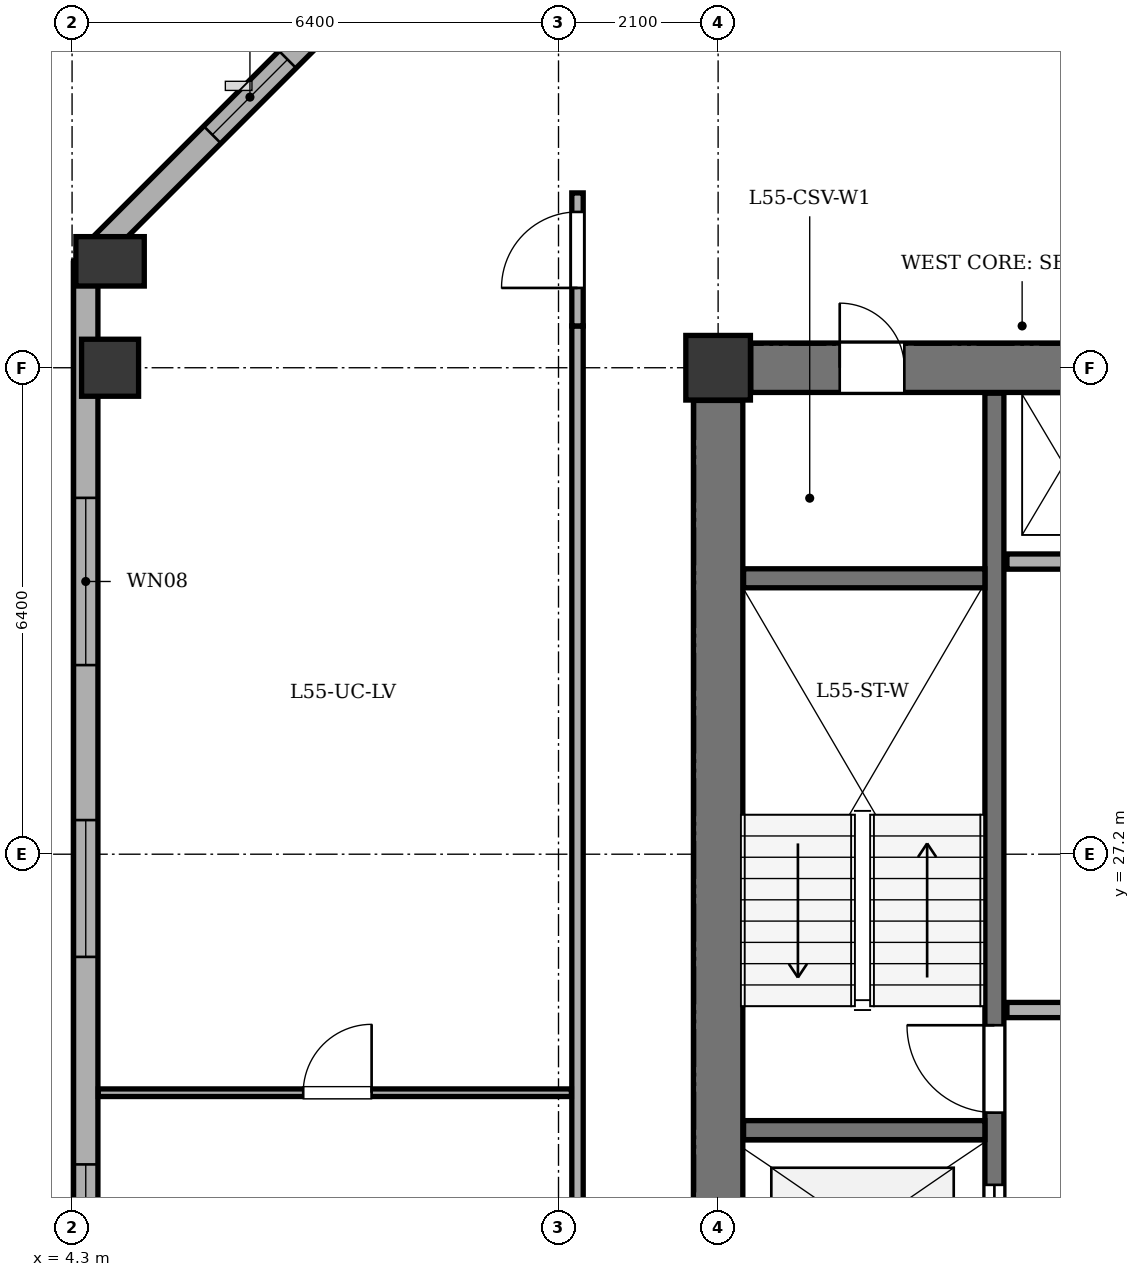
"""IFC4 building model, lengths in metres.
Left out: names, types, materials, properties, quantities, classifications, styles, units other than length and angle.
Written with IfcOpenShell. Run it as: python <this file> out.ifc"""

import sys

from ifc_helpers import new_model, si_unit, direction, frame, frame_2d, origin, origin_2d, place, context, subcontext, project, spatial, rectangle, extrude, element, fill, save


model = new_model("IFC4")
c1 = context("Model", 3, precision=1e-05, world=origin(), true_north=direction((0.0, 1.0)))
c2 = subcontext(c1, "Body", "Model", "MODEL_VIEW")
j1 = project(units=[si_unit("LENGTHUNIT", "METRE"), si_unit("PLANEANGLEUNIT", "RADIAN")], contexts=[c1])
p1 = place(None, origin())
s1 = spatial("IfcSite", under=j1, at=p1, CompositionType="ELEMENT")
p2 = place(p1, origin())
s2 = spatial("IfcBuilding", under=s1, at=p2, CompositionType="ELEMENT")
p3 = place(p2, frame((0.0, 0.0, 214.3)))
s3 = spatial("IfcBuildingStorey", under=s2, at=p3, CompositionType="ELEMENT", Elevation=214.3)
p4 = place(p3, frame((12.8, 33.6, 0.0), z_axis=(0.0, 0.0, 1.0), x_axis=(1.0, 0.0, 0.0)))
e1 = element("IfcColumn", 1, at=p4, inside=s3, PredefinedType="COLUMN", context=c2, shape_type="SweptSolid", body=[
    extrude(rectangle(XDim=0.85, YDim=0.85, at=origin_2d()), origin(), (0.0, 0.0, 1.0), 3.4),
])
p5 = place(p3, frame((4.8, 33.6, 0.0), z_axis=(0.0, 0.0, 1.0), x_axis=(1.0, 0.0, 0.0)))
e2 = element("IfcColumn", 2, at=p5, inside=s3, PredefinedType="COLUMN", context=c2, shape_type="SweptSolid", body=[
    extrude(rectangle(XDim=0.75, YDim=0.75, at=origin_2d()), origin(), (0.0, 0.0, 1.0), 3.4),
])
p6 = place(p3, frame((4.8, 35.0, 0.0), z_axis=(0.0, 0.0, 1.0), x_axis=(1.0, 0.0, 0.0)))
e3 = element("IfcColumn", 3, at=p6, inside=s3, PredefinedType="COLUMN", context=c2, shape_type="SweptSolid", body=[
    extrude(rectangle(XDim=0.65, YDim=0.9, at=origin_2d()), origin(), (0.0, 0.0, 1.0), 3.4),
])
p7 = place(p3, frame((4.48, 7.2, 0.0), z_axis=(0.0, 0.0, 1.0), x_axis=(0.0, 1.0, 0.0)))
e4 = element("IfcWall", 4, at=p7, inside=s3, PredefinedType="STANDARD", context=c2, shape_type="SweptSolid", body=[
    extrude(rectangle(XDim=27.8, YDim=0.32, at=frame_2d((13.9, 0.0))), origin(), (0.0, 0.0, 1.0), 2.725),
])
p8 = place(p7, frame((4.73, 0.0, 0.75)))
e5 = element("IfcOpeningElement", 5, at=p8, cuts=e4, PredefinedType="OPENING", context=c2, shape_type="SweptSolid", body=[
    extrude(rectangle(XDim=1.8, YDim=1.7, at=frame_2d((0.9, 0.85))), frame((0.0, 0.17, 0.0), z_axis=(0.0, -1.0, 0.0), x_axis=(1.0, 0.0, 0.0)), (0.0, 0.0, 1.0), 0.34),
])
p9 = place(p7, frame((9.295, 0.0, 0.75)))
e6 = element("IfcOpeningElement", 6, at=p9, cuts=e4, PredefinedType="OPENING", context=c2, shape_type="SweptSolid", body=[
    extrude(rectangle(XDim=2.2, YDim=1.7, at=frame_2d((1.1, 0.85))), frame((0.0, 0.17, 0.0), z_axis=(0.0, -1.0, 0.0), x_axis=(1.0, 0.0, 0.0)), (0.0, 0.0, 1.0), 0.34),
])
p10 = place(p7, frame((14.669, 0.0, 0.75)))
e7 = element("IfcOpeningElement", 7, at=p10, cuts=e4, PredefinedType="OPENING", context=c2, shape_type="SweptSolid", body=[
    extrude(rectangle(XDim=1.25, YDim=1.7, at=frame_2d((0.625, 0.85))), frame((0.0, 0.17, 0.0), z_axis=(0.0, -1.0, 0.0), x_axis=(1.0, 0.0, 0.0)), (0.0, 0.0, 1.0), 0.34),
])
p11 = place(p7, frame((18.649, 0.0, 0.75)))
e8 = element("IfcOpeningElement", 8, at=p11, cuts=e4, PredefinedType="OPENING", context=c2, shape_type="SweptSolid", body=[
    extrude(rectangle(XDim=1.8, YDim=1.7, at=frame_2d((0.9, 0.85))), frame((0.0, 0.17, 0.0), z_axis=(0.0, -1.0, 0.0), x_axis=(1.0, 0.0, 0.0)), (0.0, 0.0, 1.0), 0.34),
])
p12 = place(p7, frame((22.488, 0.0, 0.75)))
e9 = element("IfcOpeningElement", 9, at=p12, cuts=e4, PredefinedType="OPENING", context=c2, shape_type="SweptSolid", body=[
    extrude(rectangle(XDim=2.2, YDim=1.7, at=frame_2d((1.1, 0.85))), frame((0.0, 0.17, 0.0), z_axis=(0.0, -1.0, 0.0), x_axis=(1.0, 0.0, 0.0)), (0.0, 0.0, 1.0), 0.34),
])
p13 = place(p3, frame((4.48, 35.0, 0.0), z_axis=(0.0, 0.0, 1.0), x_axis=(0.707106781187, 0.707106781187, 0.0)))
e10 = element("IfcWall", 10, at=p13, inside=s3, PredefinedType="STANDARD", context=c2, shape_type="SweptSolid", body=[
    extrude(rectangle(XDim=6.11, YDim=0.32, at=frame_2d((3.055, 0.0))), origin(), (0.0, 0.0, 1.0), 2.725),
])
p14 = place(p13, frame((2.355, 0.0, 0.75)))
e11 = element("IfcOpeningElement", 11, at=p14, cuts=e10, PredefinedType="OPENING", context=c2, shape_type="SweptSolid", body=[
    extrude(rectangle(XDim=1.4, YDim=1.65, at=frame_2d((0.7, 0.825))), frame((0.0, 0.17, 0.0), z_axis=(0.0, -1.0, 0.0), x_axis=(1.0, 0.0, 0.0)), (0.0, 0.0, 1.0), 0.34),
])
p15 = place(p3, frame((12.8, 21.23, 0.0), z_axis=(0.0, 0.0, 1.0), x_axis=(0.0, 1.0, 0.0)))
e12 = element("IfcWall", 12, at=p15, inside=s3, PredefinedType="SHEAR", context=c2, shape_type="SweptSolid", body=[
    extrude(rectangle(XDim=11.94, YDim=0.65, at=frame_2d((5.97, 0.0))), origin(), (0.0, 0.0, 1.0), 3.1),
])
p16 = place(p3, frame((13.23, 33.6, 0.0), z_axis=(0.0, 0.0, 1.0), x_axis=(1.0, 0.0, 0.0)))
e13 = element("IfcWall", 13, at=p16, inside=s3, PredefinedType="SHEAR", context=c2, shape_type="SweptSolid", body=[
    extrude(rectangle(XDim=7.14, YDim=0.65, at=frame_2d((3.57, 0.0))), origin(), (0.0, 0.0, 1.0), 3.1),
])
p17 = place(p16, frame((1.17, 0.0, 0.0)))
e14 = element("IfcOpeningElement", 14, at=p17, cuts=e13, PredefinedType="OPENING", context=c2, shape_type="SweptSolid", body=[
    extrude(rectangle(XDim=0.85, YDim=2.02, at=frame_2d((0.425, 1.01))), frame((0.0, 0.335, 0.0), z_axis=(0.0, -1.0, 0.0), x_axis=(1.0, 0.0, 0.0)), (0.0, 0.0, 1.0), 0.67),
])
p18 = place(p3, frame((16.435, 21.135, 0.0), z_axis=(0.0, 0.0, 1.0), x_axis=(0.0, 1.0, 0.0)))
e15 = element("IfcWall", 15, at=p18, inside=s3, PredefinedType="SHEAR", context=c2, shape_type="SweptSolid", body=[
    extrude(rectangle(XDim=12.13, YDim=0.25, at=frame_2d((6.065, 0.0))), origin(), (0.0, 0.0, 1.0), 3.1),
])
p19 = place(p18, frame((0.515, 0.0, 0.0)))
e16 = element("IfcOpeningElement", 16, at=p19, cuts=e15, PredefinedType="OPENING", context=c2, shape_type="SweptSolid", body=[
    extrude(rectangle(XDim=1.2, YDim=2.15, at=frame_2d((0.6, 1.075))), frame((0.0, 0.135, 0.0), z_axis=(0.0, -1.0, 0.0), x_axis=(1.0, 0.0, 0.0)), (0.0, 0.0, 1.0), 0.27),
])
p20 = place(p18, frame((2.665, 0.0, 0.0)))
e17 = element("IfcOpeningElement", 17, at=p20, cuts=e15, PredefinedType="OPENING", context=c2, shape_type="SweptSolid", body=[
    extrude(rectangle(XDim=1.15, YDim=2.15, at=frame_2d((0.575, 1.075))), frame((0.0, 0.135, 0.0), z_axis=(0.0, -1.0, 0.0), x_axis=(1.0, 0.0, 0.0)), (0.0, 0.0, 1.0), 0.27),
])
for number, where, z_axis, x_axis in (
    (18, (13.135, 23.57, 0.0), (0.0, 0.0, 1.0), (1.0, 0.0, 0.0)),
    (19, (13.135, 30.83, 0.0), (0.0, 0.0, 1.0), (1.0, 0.0, 0.0)),
):
    element("IfcWall", number, at=place(p3, frame(where, z_axis=z_axis, x_axis=x_axis)), inside=s3, PredefinedType="SHEAR", context=c2, shape_type="SweptSolid", body=[
        extrude(rectangle(XDim=3.175, YDim=0.25, at=frame_2d((1.587, 0.0))), origin(), (0.0, 0.0, 1.0), 3.1),
    ])
for number, where, z_axis, x_axis in (
    (20, (16.6, 25.15, 0.0), (0.0, 0.0, 1.0), (1.0, 0.0, 0.0)),
    (21, (16.6, 31.05, 0.0), (0.0, 0.0, 1.0), (1.0, 0.0, 0.0)),
):
    element("IfcWall", number, at=place(p3, frame(where, z_axis=z_axis, x_axis=x_axis)), inside=s3, PredefinedType="SOLIDWALL", context=c2, shape_type="SweptSolid", body=[
        extrude(rectangle(XDim=3.85, YDim=0.2, at=frame_2d((1.925, 0.0))), origin(), (0.0, 0.0, 1.0), 3.1),
    ])
p21 = place(p3, frame((10.95, 20.25, 0.0), z_axis=(0.0, 0.0, 1.0), x_axis=(0.0, 1.0, 0.0)))
e22 = element("IfcWall", 22, at=p21, inside=s3, PredefinedType="PARTITIONING", context=c2, shape_type="SweptSolid", body=[
    extrude(rectangle(XDim=13.9, YDim=0.15, at=frame_2d((6.95, 0.0))), origin(), (0.0, 0.0, 1.0), 3.1),
])
p22 = place(p3, frame((10.95, 34.15, 0.0), z_axis=(0.0, 0.0, 1.0), x_axis=(0.0, 1.0, 0.0)))
e23 = element("IfcWall", 23, at=p22, inside=s3, PredefinedType="PARTITIONING", context=c2, shape_type="SweptSolid", body=[
    extrude(rectangle(XDim=1.75, YDim=0.15, at=frame_2d((0.875, 0.0))), origin(), (0.0, 0.0, 1.0), 3.1),
])
p23 = place(p22, frame((0.5, 0.0, 0.0)))
e24 = element("IfcOpeningElement", 24, at=p23, cuts=e23, PredefinedType="OPENING", context=c2, shape_type="SweptSolid", body=[
    extrude(rectangle(XDim=1.0, YDim=2.1, at=frame_2d((0.5, 1.05))), frame((0.0, 0.085, 0.0), z_axis=(0.0, -1.0, 0.0), x_axis=(1.0, 0.0, 0.0)), (0.0, 0.0, 1.0), 0.17),
])
p24 = place(p3, frame((4.645, 24.062, 0.0), z_axis=(0.0, 0.0, 1.0), x_axis=(1.0, 0.0, 0.0)))
e25 = element("IfcWall", 25, at=p24, inside=s3, PredefinedType="PARTITIONING", context=c2, shape_type="SweptSolid", body=[
    extrude(rectangle(XDim=6.225, YDim=0.1, at=frame_2d((3.113, 0.0))), origin(), (0.0, 0.0, 1.0), 3.1),
])
p25 = place(p24, frame((2.696, 0.0, 0.0)))
e26 = element("IfcOpeningElement", 26, at=p25, cuts=e25, PredefinedType="OPENING", context=c2, shape_type="SweptSolid", body=[
    extrude(rectangle(XDim=0.9, YDim=2.05, at=frame_2d((0.45, 1.025))), frame((0.0, 0.06, 0.0), z_axis=(0.0, -1.0, 0.0), x_axis=(1.0, 0.0, 0.0)), (0.0, 0.0, 1.0), 0.12),
])
p26 = place(p10, origin())
e27 = element("IfcWindow", 27, at=p26, inside=s3, PartitioningType="SINGLE_PANEL", PredefinedType="WINDOW", context=c2, shape_type="SweptSolid", body=[
    extrude(rectangle(XDim=1.25, YDim=1.7, at=frame_2d((0.625, 0.85))), frame((0.0, -0.01, 0.0), z_axis=(0.0, -1.0, 0.0), x_axis=(1.0, 0.0, 0.0)), (0.0, 0.0, 1.0), 0.06),
])
fill(e7, e27)
p27 = place(p11, origin())
e28 = element("IfcWindow", 28, at=p27, inside=s3, PartitioningType="SINGLE_PANEL", PredefinedType="WINDOW", context=c2, shape_type="SweptSolid", body=[
    extrude(rectangle(XDim=1.8, YDim=1.7, at=frame_2d((0.9, 0.85))), frame((0.0, -0.01, 0.0), z_axis=(0.0, -1.0, 0.0), x_axis=(1.0, 0.0, 0.0)), (0.0, 0.0, 1.0), 0.06),
])
fill(e8, e28)
p28 = place(p12, origin())
e29 = element("IfcWindow", 29, at=p28, inside=s3, PartitioningType="SINGLE_PANEL", PredefinedType="WINDOW", context=c2, shape_type="SweptSolid", body=[
    extrude(rectangle(XDim=2.2, YDim=1.7, at=frame_2d((1.1, 0.85))), frame((0.0, -0.01, 0.0), z_axis=(0.0, -1.0, 0.0), x_axis=(1.0, 0.0, 0.0)), (0.0, 0.0, 1.0), 0.06),
])
fill(e9, e29)
p29 = place(p14, origin())
e30 = element("IfcWindow", 30, at=p29, inside=s3, PartitioningType="SINGLE_PANEL", PredefinedType="WINDOW", context=c2, shape_type="SweptSolid", body=[
    extrude(rectangle(XDim=1.4, YDim=1.65, at=frame_2d((0.7, 0.825))), frame((0.0, -0.01, 0.0), z_axis=(0.0, -1.0, 0.0), x_axis=(1.0, 0.0, 0.0)), (0.0, 0.0, 1.0), 0.06),
])
fill(e11, e30)
p30 = place(p17, origin())
e31 = element("IfcDoor", 31, at=p30, inside=s3, OperationType="SINGLE_SWING_LEFT", PredefinedType="DOOR", context=c2, shape_type="SweptSolid", body=[
    extrude(rectangle(XDim=0.85, YDim=2.02, at=frame_2d((0.425, 1.01))), frame((0.0, 0.025, 0.0), z_axis=(0.0, -1.0, 0.0), x_axis=(1.0, 0.0, 0.0)), (0.0, 0.0, 1.0), 0.05),
])
fill(e14, e31)
p31 = place(p19, origin())
e32 = element("IfcDoor", 32, at=p31, inside=s3, OperationType="DOUBLE_DOOR_SLIDING", PredefinedType="DOOR", context=c2, shape_type="SweptSolid", body=[
    extrude(rectangle(XDim=1.2, YDim=2.15, at=frame_2d((0.6, 1.075))), frame((0.0, 0.025, 0.0), z_axis=(0.0, -1.0, 0.0), x_axis=(1.0, 0.0, 0.0)), (0.0, 0.0, 1.0), 0.05),
])
fill(e16, e32)
p32 = place(p20, origin())
e33 = element("IfcDoor", 33, at=p32, inside=s3, OperationType="SINGLE_SWING_RIGHT", PredefinedType="DOOR", context=c2, shape_type="SweptSolid", body=[
    extrude(rectangle(XDim=1.15, YDim=2.15, at=frame_2d((0.575, 1.075))), frame((0.0, 0.025, 0.0), z_axis=(0.0, -1.0, 0.0), x_axis=(1.0, 0.0, 0.0)), (0.0, 0.0, 1.0), 0.05),
])
fill(e17, e33)
p33 = place(p23, origin())
e34 = element("IfcDoor", 34, at=p33, inside=s3, OperationType="SINGLE_SWING_LEFT", PredefinedType="DOOR", context=c2, shape_type="SweptSolid", body=[
    extrude(rectangle(XDim=1.0, YDim=2.1, at=frame_2d((0.5, 1.05))), frame((0.0, 0.025, 0.0), z_axis=(0.0, -1.0, 0.0), x_axis=(1.0, 0.0, 0.0)), (0.0, 0.0, 1.0), 0.05),
])
fill(e24, e34)
p34 = place(p25, origin())
e35 = element("IfcDoor", 35, at=p34, inside=s3, OperationType="SINGLE_SWING_RIGHT", PredefinedType="DOOR", context=c2, shape_type="SweptSolid", body=[
    extrude(rectangle(XDim=0.9, YDim=2.05, at=frame_2d((0.45, 1.025))), frame((0.0, 0.025, 0.0), z_axis=(0.0, -1.0, 0.0), x_axis=(1.0, 0.0, 0.0)), (0.0, 0.0, 1.0), 0.05),
])
fill(e26, e35)
save(model, sys.argv[1])
